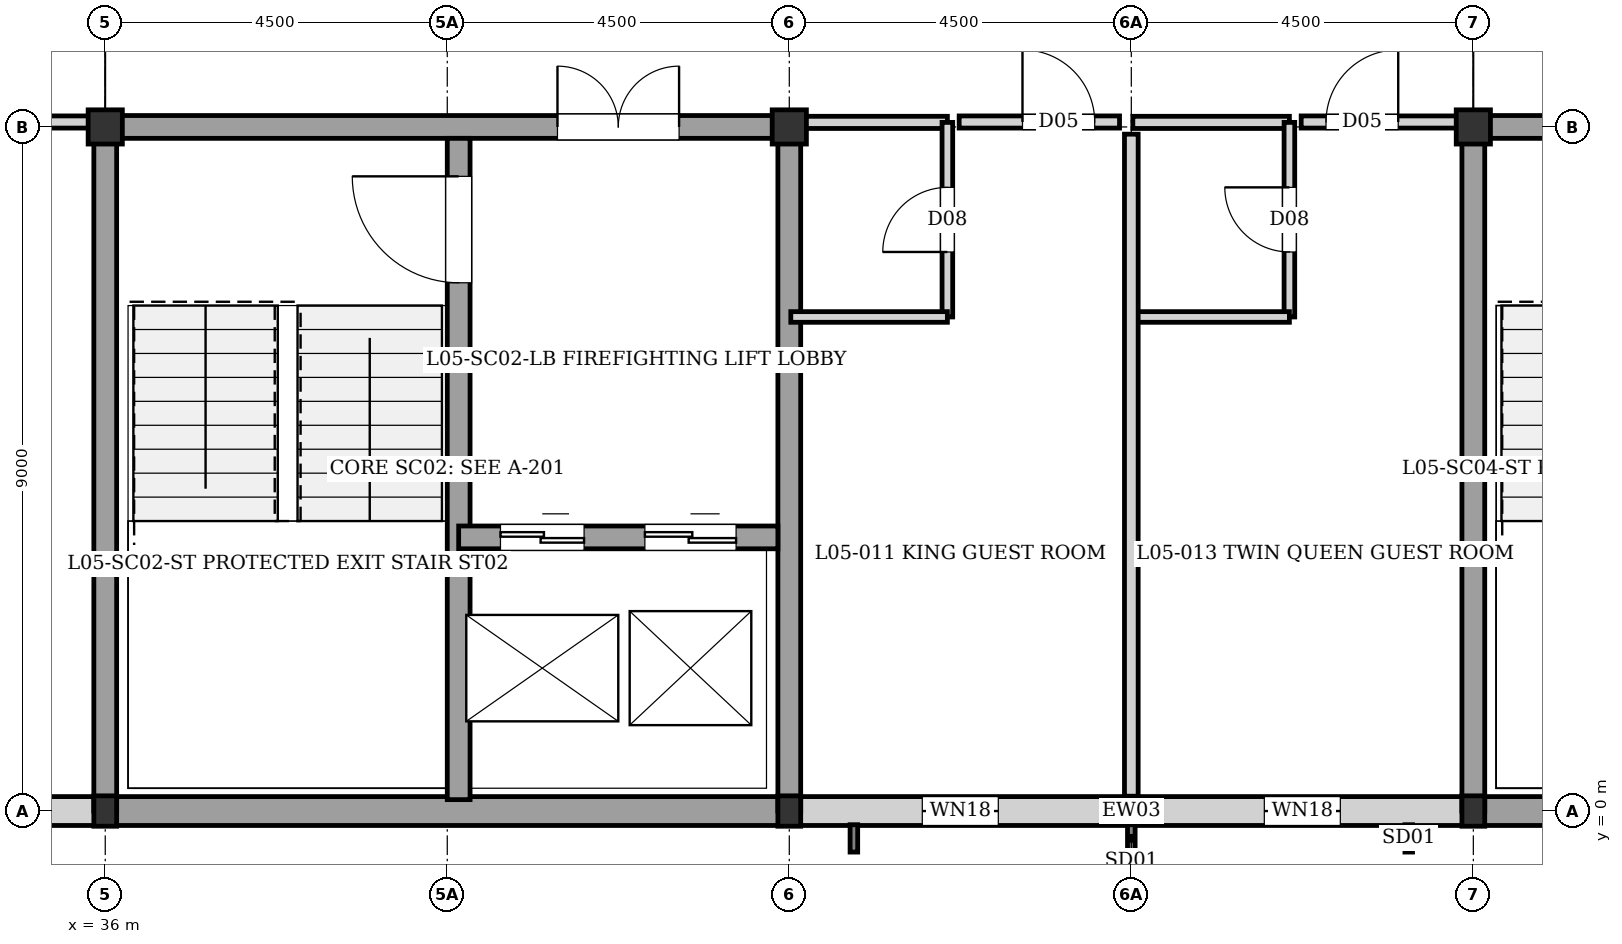
"""IFC4 building model, lengths in metres.
Left out: names, types, materials, properties, quantities, classifications, styles, units other than length and angle.
Written with IfcOpenShell. Run it as: python <this file> out.ifc"""

import sys

from ifc_helpers import new_model, si_unit, direction, frame, frame_2d, origin, origin_2d, place, context, subcontext, project, spatial, rectangle, i_section, extrude, element, fill, save


model = new_model("IFC4")
c1 = context("Model", 3, precision=1e-05, world=origin(), true_north=direction((0.0, 1.0)))
c2 = subcontext(c1, "Body", "Model", "MODEL_VIEW")
j1 = project(units=[si_unit("LENGTHUNIT", "METRE"), si_unit("PLANEANGLEUNIT", "RADIAN")], contexts=[c1])
p1 = place(None, origin())
s1 = spatial("IfcSite", under=j1, at=p1, CompositionType="ELEMENT")
p2 = place(p1, origin())
s2 = spatial("IfcBuilding", under=s1, at=p2, CompositionType="ELEMENT")
p3 = place(p2, frame((0.0, 0.0, 17.6)))
s3 = spatial("IfcBuildingStorey", under=s2, at=p3, CompositionType="ELEMENT", Elevation=17.6)
p4 = place(p3, frame((36.0, 0.0, 0.0), z_axis=(0.0, 0.0, 1.0), x_axis=(1.0, 0.0, 0.0)))
e1 = element("IfcColumn", 1, at=p4, inside=s3, PredefinedType="COLUMN", context=c2, shape_type="SweptSolid", body=[
    extrude(i_section(OverallWidth=0.3, OverallDepth=0.4, WebThickness=0.013, FlangeThickness=0.024, at=origin_2d()), origin(), (0.0, 0.0, 1.0), 3.04),
])
p5 = place(p3, frame((36.0, 9.0, 0.0), z_axis=(0.0, 0.0, 1.0), x_axis=(1.0, 0.0, 0.0)))
e2 = element("IfcColumn", 2, at=p5, inside=s3, PredefinedType="COLUMN", context=c2, shape_type="SweptSolid", body=[
    extrude(rectangle(XDim=0.45, YDim=0.45, at=origin_2d()), origin(), (0.0, 0.0, 1.0), 3.04),
])
p6 = place(p3, frame((45.0, 0.0, 0.0), z_axis=(0.0, 0.0, 1.0), x_axis=(1.0, 0.0, 0.0)))
e3 = element("IfcColumn", 3, at=p6, inside=s3, PredefinedType="COLUMN", context=c2, shape_type="SweptSolid", body=[
    extrude(i_section(OverallWidth=0.3, OverallDepth=0.4, WebThickness=0.013, FlangeThickness=0.024, at=origin_2d()), origin(), (0.0, 0.0, 1.0), 3.04),
])
p7 = place(p3, frame((45.0, 9.0, 0.0), z_axis=(0.0, 0.0, 1.0), x_axis=(1.0, 0.0, 0.0)))
e4 = element("IfcColumn", 4, at=p7, inside=s3, PredefinedType="COLUMN", context=c2, shape_type="SweptSolid", body=[
    extrude(rectangle(XDim=0.45, YDim=0.45, at=origin_2d()), origin(), (0.0, 0.0, 1.0), 3.04),
])
p8 = place(p3, frame((54.0, 0.0, 0.0), z_axis=(0.0, 0.0, 1.0), x_axis=(1.0, 0.0, 0.0)))
e5 = element("IfcColumn", 5, at=p8, inside=s3, PredefinedType="COLUMN", context=c2, shape_type="SweptSolid", body=[
    extrude(i_section(OverallWidth=0.3, OverallDepth=0.4, WebThickness=0.013, FlangeThickness=0.024, at=origin_2d()), origin(), (0.0, 0.0, 1.0), 3.04),
])
p9 = place(p3, frame((54.0, 9.0, 0.0), z_axis=(0.0, 0.0, 1.0), x_axis=(1.0, 0.0, 0.0)))
e6 = element("IfcColumn", 6, at=p9, inside=s3, PredefinedType="COLUMN", context=c2, shape_type="SweptSolid", body=[
    extrude(rectangle(XDim=0.45, YDim=0.45, at=origin_2d()), origin(), (0.0, 0.0, 1.0), 3.04),
])
p10 = place(p3, frame((63.0, 0.0, 0.0), z_axis=(0.0, 0.0, 1.0), x_axis=(-1.0, 0.0, 0.0)))
e7 = element("IfcWall", 7, at=p10, inside=s3, PredefinedType="SOLIDWALL", context=c2, shape_type="SweptSolid", body=[
    extrude(rectangle(XDim=9.0, YDim=0.38, at=frame_2d((4.5, 0.0))), origin(), (0.0, 0.0, 1.0), 2.82),
])
p11 = place(p3, frame((53.87, 0.0, 0.0), z_axis=(0.0, 0.0, 1.0), x_axis=(-1.0, 0.0, 0.0)))
e8 = element("IfcWall", 8, at=p11, inside=s3, PredefinedType="SOLIDWALL", context=c2, shape_type="SweptSolid", body=[
    extrude(rectangle(XDim=8.74, YDim=0.38, at=frame_2d((4.37, 0.0))), origin(), (0.0, 0.0, 1.0), 2.55),
])
p12 = place(p11, frame((1.62, 0.0, 0.35)))
e9 = element("IfcOpeningElement", 9, at=p12, cuts=e8, PredefinedType="OPENING", context=c2, shape_type="SweptSolid", body=[
    extrude(rectangle(XDim=1.0, YDim=1.6, at=frame_2d((0.5, 0.8))), frame((0.0, 0.2, 0.0), z_axis=(0.0, -1.0, 0.0), x_axis=(1.0, 0.0, 0.0)), (0.0, 0.0, 1.0), 0.4),
])
p13 = place(p11, frame((6.12, 0.0, 0.35)))
e10 = element("IfcOpeningElement", 10, at=p13, cuts=e8, PredefinedType="OPENING", context=c2, shape_type="SweptSolid", body=[
    extrude(rectangle(XDim=1.0, YDim=1.6, at=frame_2d((0.5, 0.8))), frame((0.0, 0.2, 0.0), z_axis=(0.0, -1.0, 0.0), x_axis=(1.0, 0.0, 0.0)), (0.0, 0.0, 1.0), 0.4),
])
p14 = place(p3, frame((45.0, 0.0, 0.0), z_axis=(0.0, 0.0, 1.0), x_axis=(-1.0, 0.0, 0.0)))
e11 = element("IfcWall", 11, at=p14, inside=s3, PredefinedType="SOLIDWALL", context=c2, shape_type="SweptSolid", body=[
    extrude(rectangle(XDim=9.0, YDim=0.38, at=frame_2d((4.5, 0.0))), origin(), (0.0, 0.0, 1.0), 2.82),
])
p15 = place(p3, frame((35.87, 0.0, 0.0), z_axis=(0.0, 0.0, 1.0), x_axis=(-1.0, 0.0, 0.0)))
e12 = element("IfcWall", 12, at=p15, inside=s3, PredefinedType="SOLIDWALL", context=c2, shape_type="SweptSolid", body=[
    extrude(rectangle(XDim=8.87, YDim=0.38, at=frame_2d((4.435, 0.0))), origin(), (0.0, 0.0, 1.0), 2.42),
])
p16 = place(p15, frame((1.62, 0.0, 0.35)))
e13 = element("IfcOpeningElement", 13, at=p16, cuts=e12, PredefinedType="OPENING", context=c2, shape_type="SweptSolid", body=[
    extrude(rectangle(XDim=1.0, YDim=1.6, at=frame_2d((0.5, 0.8))), frame((0.0, 0.2, 0.0), z_axis=(0.0, -1.0, 0.0), x_axis=(1.0, 0.0, 0.0)), (0.0, 0.0, 1.0), 0.4),
])
p17 = place(p15, frame((6.12, 0.0, 0.35)))
e14 = element("IfcOpeningElement", 14, at=p17, cuts=e12, PredefinedType="OPENING", context=c2, shape_type="SweptSolid", body=[
    extrude(rectangle(XDim=1.0, YDim=1.6, at=frame_2d((0.5, 0.8))), frame((0.0, 0.2, 0.0), z_axis=(0.0, -1.0, 0.0), x_axis=(1.0, 0.0, 0.0)), (0.0, 0.0, 1.0), 0.4),
])
p18 = place(p3, frame((45.0, 0.0, 0.0), z_axis=(0.0, 0.0, 1.0), x_axis=(0.0, 1.0, 0.0)))
e15 = element("IfcWall", 15, at=p18, inside=s3, PredefinedType="SHEAR", context=c2, shape_type="SweptSolid", body=[
    extrude(rectangle(XDim=9.0, YDim=0.3, at=frame_2d((4.5, 0.0))), origin(), (0.0, 0.0, 1.0), 2.82),
])
p19 = place(p3, frame((36.0, 9.0, 0.0), z_axis=(0.0, 0.0, 1.0), x_axis=(1.0, 0.0, 0.0)))
e16 = element("IfcWall", 16, at=p19, inside=s3, PredefinedType="SHEAR", context=c2, shape_type="SweptSolid", body=[
    extrude(rectangle(XDim=9.0, YDim=0.3, at=frame_2d((4.5, 0.0))), origin(), (0.0, 0.0, 1.0), 2.82),
])
p20 = place(p19, frame((5.95, 0.0, 0.0)))
e17 = element("IfcOpeningElement", 17, at=p20, cuts=e16, PredefinedType="OPENING", context=c2, shape_type="SweptSolid", body=[
    extrude(rectangle(XDim=1.6, YDim=2.1, at=frame_2d((0.8, 1.05))), frame((0.0, 0.16, 0.0), z_axis=(0.0, -1.0, 0.0), x_axis=(1.0, 0.0, 0.0)), (0.0, 0.0, 1.0), 0.32),
])
p21 = place(p3, frame((36.0, 0.0, 0.0), z_axis=(0.0, 0.0, 1.0), x_axis=(0.0, 1.0, 0.0)))
e18 = element("IfcWall", 18, at=p21, inside=s3, PredefinedType="SHEAR", context=c2, shape_type="SweptSolid", body=[
    extrude(rectangle(XDim=9.0, YDim=0.3, at=frame_2d((4.5, 0.0))), origin(), (0.0, 0.0, 1.0), 2.82),
])
p22 = place(p3, frame((40.65, 0.15, 0.0), z_axis=(0.0, 0.0, 1.0), x_axis=(0.0, 1.0, 0.0)))
e19 = element("IfcWall", 19, at=p22, inside=s3, PredefinedType="SHEAR", context=c2, shape_type="SweptSolid", body=[
    extrude(rectangle(XDim=8.7, YDim=0.3, at=frame_2d((4.35, 0.0))), origin(), (0.0, 0.0, 1.0), 2.82),
])
p23 = place(p22, frame((6.8, 0.0, 0.0)))
e20 = element("IfcOpeningElement", 20, at=p23, cuts=e19, PredefinedType="OPENING", context=c2, shape_type="SweptSolid", body=[
    extrude(rectangle(XDim=1.4, YDim=2.02, at=frame_2d((0.7, 1.01))), frame((0.0, 0.16, 0.0), z_axis=(0.0, -1.0, 0.0), x_axis=(1.0, 0.0, 0.0)), (0.0, 0.0, 1.0), 0.32),
])
p24 = place(p3, frame((40.65, 3.6, 0.0), z_axis=(0.0, 0.0, 1.0), x_axis=(1.0, 0.0, 0.0)))
e21 = element("IfcWall", 21, at=p24, inside=s3, PredefinedType="SHEAR", context=c2, shape_type="SweptSolid", body=[
    extrude(rectangle(XDim=4.2, YDim=0.3, at=frame_2d((2.1, 0.0))), origin(), (0.0, 0.0, 1.0), 2.82),
])
p25 = place(p24, frame((0.55, 0.0, 0.0)))
e22 = element("IfcOpeningElement", 22, at=p25, cuts=e21, PredefinedType="OPENING", context=c2, shape_type="SweptSolid", body=[
    extrude(rectangle(XDim=1.1, YDim=2.1, at=frame_2d((0.55, 1.05))), frame((0.0, 0.16, 0.0), z_axis=(0.0, -1.0, 0.0), x_axis=(1.0, 0.0, 0.0)), (0.0, 0.0, 1.0), 0.32),
])
p26 = place(p24, frame((2.45, 0.0, 0.0)))
e23 = element("IfcOpeningElement", 23, at=p26, cuts=e21, PredefinedType="OPENING", context=c2, shape_type="SweptSolid", body=[
    extrude(rectangle(XDim=1.2, YDim=2.2, at=frame_2d((0.6, 1.1))), frame((0.0, 0.16, 0.0), z_axis=(0.0, -1.0, 0.0), x_axis=(1.0, 0.0, 0.0)), (0.0, 0.0, 1.0), 0.32),
])
p27 = place(p3, frame((54.0, 9.0, 0.0), z_axis=(0.0, 0.0, 1.0), x_axis=(1.0, 0.0, 0.0)))
e24 = element("IfcWall", 24, at=p27, inside=s3, PredefinedType="SHEAR", context=c2, shape_type="SweptSolid", body=[
    extrude(rectangle(XDim=9.0, YDim=0.3, at=frame_2d((4.5, 0.0))), origin(), (0.0, 0.0, 1.0), 2.82),
])
p28 = place(p27, frame((6.05, 0.0, 0.0)))
e25 = element("IfcOpeningElement", 25, at=p28, cuts=e24, PredefinedType="OPENING", context=c2, shape_type="SweptSolid", body=[
    extrude(rectangle(XDim=1.4, YDim=2.02, at=frame_2d((0.7, 1.01))), frame((0.0, 0.16, 0.0), z_axis=(0.0, -1.0, 0.0), x_axis=(1.0, 0.0, 0.0)), (0.0, 0.0, 1.0), 0.32),
])
p29 = place(p3, frame((54.0, 0.0, 0.0), z_axis=(0.0, 0.0, 1.0), x_axis=(0.0, 1.0, 0.0)))
e26 = element("IfcWall", 26, at=p29, inside=s3, PredefinedType="SHEAR", context=c2, shape_type="SweptSolid", body=[
    extrude(rectangle(XDim=9.0, YDim=0.3, at=frame_2d((4.5, 0.0))), origin(), (0.0, 0.0, 1.0), 2.82),
])
p30 = place(p3, frame((45.02, 9.06, 0.0), z_axis=(0.0, 0.0, 1.0), x_axis=(1.0, 0.0, 0.0)))
e27 = element("IfcWall", 27, at=p30, inside=s3, PredefinedType="PARTITIONING", context=c2, shape_type="SweptSolid", body=[
    extrude(rectangle(XDim=2.06, YDim=0.16, at=frame_2d((1.03, 0.0))), origin(), (0.0, 0.0, 1.0), 2.38),
])
p31 = place(p3, frame((47.08, 6.5, 0.0), z_axis=(0.0, 0.0, 1.0), x_axis=(0.0, 1.0, 0.0)))
e28 = element("IfcWall", 28, at=p31, inside=s3, PredefinedType="PLUMBINGWALL", context=c2, shape_type="SweptSolid", body=[
    extrude(rectangle(XDim=2.56, YDim=0.14, at=frame_2d((1.28, 0.0))), origin(), (0.0, 0.0, 1.0), 2.82),
])
p32 = place(p31, frame((0.855, 0.0, 0.0)))
e29 = element("IfcOpeningElement", 29, at=p32, cuts=e28, PredefinedType="OPENING", context=c2, shape_type="SweptSolid", body=[
    extrude(rectangle(XDim=0.85, YDim=2.04, at=frame_2d((0.425, 1.02))), frame((0.0, 0.08, 0.0), z_axis=(0.0, -1.0, 0.0), x_axis=(1.0, 0.0, 0.0)), (0.0, 0.0, 1.0), 0.16),
])
p33 = place(p3, frame((45.02, 6.5, 0.0), z_axis=(0.0, 0.0, 1.0), x_axis=(1.0, 0.0, 0.0)))
e30 = element("IfcWall", 30, at=p33, inside=s3, PredefinedType="PLUMBINGWALL", context=c2, shape_type="SweptSolid", body=[
    extrude(rectangle(XDim=2.06, YDim=0.14, at=frame_2d((1.03, 0.0))), origin(), (0.0, 0.0, 1.0), 2.82),
])
p34 = place(p3, frame((49.52, 9.06, 0.0), z_axis=(0.0, 0.0, 1.0), x_axis=(1.0, 0.0, 0.0)))
e31 = element("IfcWall", 31, at=p34, inside=s3, PredefinedType="PARTITIONING", context=c2, shape_type="SweptSolid", body=[
    extrude(rectangle(XDim=2.06, YDim=0.16, at=frame_2d((1.03, 0.0))), origin(), (0.0, 0.0, 1.0), 2.38),
])
p35 = place(p3, frame((51.58, 6.5, 0.0), z_axis=(0.0, 0.0, 1.0), x_axis=(0.0, 1.0, 0.0)))
e32 = element("IfcWall", 32, at=p35, inside=s3, PredefinedType="PLUMBINGWALL", context=c2, shape_type="SweptSolid", body=[
    extrude(rectangle(XDim=2.56, YDim=0.14, at=frame_2d((1.28, 0.0))), origin(), (0.0, 0.0, 1.0), 2.82),
])
p36 = place(p35, frame((0.855, 0.0, 0.0)))
e33 = element("IfcOpeningElement", 33, at=p36, cuts=e32, PredefinedType="OPENING", context=c2, shape_type="SweptSolid", body=[
    extrude(rectangle(XDim=0.85, YDim=2.04, at=frame_2d((0.425, 1.02))), frame((0.0, 0.08, 0.0), z_axis=(0.0, -1.0, 0.0), x_axis=(1.0, 0.0, 0.0)), (0.0, 0.0, 1.0), 0.16),
])
p37 = place(p3, frame((49.52, 6.5, 0.0), z_axis=(0.0, 0.0, 1.0), x_axis=(1.0, 0.0, 0.0)))
e34 = element("IfcWall", 34, at=p37, inside=s3, PredefinedType="PLUMBINGWALL", context=c2, shape_type="SweptSolid", body=[
    extrude(rectangle(XDim=2.06, YDim=0.14, at=frame_2d((1.03, 0.0))), origin(), (0.0, 0.0, 1.0), 2.82),
])
p38 = place(p3, frame((49.5, 0.195, 0.0), z_axis=(0.0, 0.0, 1.0), x_axis=(0.0, 1.0, 0.0)))
e35 = element("IfcWall", 35, at=p38, inside=s3, PredefinedType="PARTITIONING", context=c2, shape_type="SweptSolid", body=[
    extrude(rectangle(XDim=8.71, YDim=0.18, at=frame_2d((4.355, 0.0))), origin(), (0.0, 0.0, 1.0), 2.82),
])
p39 = place(p3, frame((29.285, 9.065, 0.0), z_axis=(0.0, 0.0, 1.0), x_axis=(1.0, 0.0, 0.0)))
e36 = element("IfcWall", 36, at=p39, inside=s3, PredefinedType="PARTITIONING", context=c2, shape_type="SweptSolid", body=[
    extrude(rectangle(XDim=6.56, YDim=0.16, at=frame_2d((3.28, 0.0))), origin(), (0.0, 0.0, 1.0), 2.29),
])
p40 = place(p39, frame((1.75, 0.0, 0.0)))
e37 = element("IfcOpeningElement", 37, at=p40, cuts=e36, PredefinedType="OPENING", context=c2, shape_type="SweptSolid", body=[
    extrude(rectangle(XDim=1.3, YDim=2.25, at=frame_2d((0.65, 1.125))), frame((0.0, 0.09, 0.0), z_axis=(0.0, -1.0, 0.0), x_axis=(1.0, 0.0, 0.0)), (0.0, 0.0, 1.0), 0.18),
])
p41 = place(p3, frame((47.235, 9.065, 0.0), z_axis=(0.0, 0.0, 1.0), x_axis=(1.0, 0.0, 0.0)))
e38 = element("IfcWall", 38, at=p41, inside=s3, PredefinedType="PARTITIONING", context=c2, shape_type="SweptSolid", body=[
    extrude(rectangle(XDim=2.11, YDim=0.16, at=frame_2d((1.055, 0.0))), origin(), (0.0, 0.0, 1.0), 2.38),
])
p42 = place(p41, frame((0.833, 0.0, 0.0)))
e39 = element("IfcOpeningElement", 39, at=p42, cuts=e38, PredefinedType="OPENING", context=c2, shape_type="SweptSolid", body=[
    extrude(rectangle(XDim=0.95, YDim=2.15, at=frame_2d((0.475, 1.075))), frame((0.0, 0.09, 0.0), z_axis=(0.0, -1.0, 0.0), x_axis=(1.0, 0.0, 0.0)), (0.0, 0.0, 1.0), 0.18),
])
p43 = place(p3, frame((51.735, 9.065, 0.0), z_axis=(0.0, 0.0, 1.0), x_axis=(1.0, 0.0, 0.0)))
e40 = element("IfcWall", 40, at=p43, inside=s3, PredefinedType="PARTITIONING", context=c2, shape_type="SweptSolid", body=[
    extrude(rectangle(XDim=2.11, YDim=0.16, at=frame_2d((1.055, 0.0))), origin(), (0.0, 0.0, 1.0), 2.38),
])
p44 = place(p43, frame((0.327, 0.0, 0.0)))
e41 = element("IfcOpeningElement", 41, at=p44, cuts=e40, PredefinedType="OPENING", context=c2, shape_type="SweptSolid", body=[
    extrude(rectangle(XDim=0.95, YDim=2.15, at=frame_2d((0.475, 1.075))), frame((0.0, 0.09, 0.0), z_axis=(0.0, -1.0, 0.0), x_axis=(1.0, 0.0, 0.0)), (0.0, 0.0, 1.0), 0.18),
])
p45 = place(p12, origin())
e42 = element("IfcWindow", 42, at=p45, inside=s3, PartitioningType="SINGLE_PANEL", PredefinedType="WINDOW", context=c2, shape_type="SweptSolid", body=[
    extrude(rectangle(XDim=1.0, YDim=1.6, at=frame_2d((0.5, 0.8))), frame((0.0, 0.03, 0.0), z_axis=(0.0, -1.0, 0.0), x_axis=(1.0, 0.0, 0.0)), (0.0, 0.0, 1.0), 0.06),
])
fill(e9, e42)
p46 = place(p13, origin())
e43 = element("IfcWindow", 43, at=p46, inside=s3, PartitioningType="SINGLE_PANEL", PredefinedType="WINDOW", context=c2, shape_type="SweptSolid", body=[
    extrude(rectangle(XDim=1.0, YDim=1.6, at=frame_2d((0.5, 0.8))), frame((0.0, 0.03, 0.0), z_axis=(0.0, -1.0, 0.0), x_axis=(1.0, 0.0, 0.0)), (0.0, 0.0, 1.0), 0.06),
])
fill(e10, e43)
p47 = place(p20, origin())
e44 = element("IfcDoor", 44, at=p47, inside=s3, OperationType="DOUBLE_DOOR_SINGLE_SWING", PredefinedType="DOOR", context=c2, shape_type="SweptSolid", body=[
    extrude(rectangle(XDim=1.6, YDim=2.1, at=frame_2d((0.8, 1.05))), frame((0.0, 0.025, 0.0), z_axis=(0.0, -1.0, 0.0), x_axis=(1.0, 0.0, 0.0)), (0.0, 0.0, 1.0), 0.05),
])
fill(e17, e44)
p48 = place(p23, origin())
e45 = element("IfcDoor", 45, at=p48, inside=s3, OperationType="SINGLE_SWING_RIGHT", PredefinedType="DOOR", context=c2, shape_type="SweptSolid", body=[
    extrude(rectangle(XDim=1.4, YDim=2.02, at=frame_2d((0.7, 1.01))), frame((0.0, 0.025, 0.0), z_axis=(0.0, -1.0, 0.0), x_axis=(1.0, 0.0, 0.0)), (0.0, 0.0, 1.0), 0.05),
])
fill(e20, e45)
p49 = place(p25, origin())
e46 = element("IfcDoor", 46, at=p49, inside=s3, OperationType="DOUBLE_DOOR_SLIDING", PredefinedType="DOOR", context=c2, shape_type="SweptSolid", body=[
    extrude(rectangle(XDim=1.1, YDim=2.1, at=frame_2d((0.55, 1.05))), frame((0.0, 0.025, 0.0), z_axis=(0.0, -1.0, 0.0), x_axis=(1.0, 0.0, 0.0)), (0.0, 0.0, 1.0), 0.05),
])
fill(e22, e46)
p50 = place(p26, origin())
e47 = element("IfcDoor", 47, at=p50, inside=s3, OperationType="DOUBLE_DOOR_SLIDING", PredefinedType="DOOR", context=c2, shape_type="SweptSolid", body=[
    extrude(rectangle(XDim=1.2, YDim=2.2, at=frame_2d((0.6, 1.1))), frame((0.0, 0.025, 0.0), z_axis=(0.0, -1.0, 0.0), x_axis=(1.0, 0.0, 0.0)), (0.0, 0.0, 1.0), 0.05),
])
fill(e23, e47)
p51 = place(p32, origin())
e48 = element("IfcDoor", 48, at=p51, inside=s3, OperationType="SINGLE_SWING_LEFT", PredefinedType="DOOR", context=c2, shape_type="SweptSolid", body=[
    extrude(rectangle(XDim=0.85, YDim=2.04, at=frame_2d((0.425, 1.02))), frame((0.0, 0.025, 0.0), z_axis=(0.0, -1.0, 0.0), x_axis=(1.0, 0.0, 0.0)), (0.0, 0.0, 1.0), 0.05),
])
fill(e29, e48)
p52 = place(p36, origin())
e49 = element("IfcDoor", 49, at=p52, inside=s3, OperationType="SINGLE_SWING_RIGHT", PredefinedType="DOOR", context=c2, shape_type="SweptSolid", body=[
    extrude(rectangle(XDim=0.85, YDim=2.04, at=frame_2d((0.425, 1.02))), frame((0.0, 0.025, 0.0), z_axis=(0.0, -1.0, 0.0), x_axis=(1.0, 0.0, 0.0)), (0.0, 0.0, 1.0), 0.05),
])
fill(e33, e49)
p53 = place(p42, origin())
e50 = element("IfcDoor", 50, at=p53, inside=s3, OperationType="SINGLE_SWING_LEFT", PredefinedType="DOOR", context=c2, shape_type="SweptSolid", body=[
    extrude(rectangle(XDim=0.95, YDim=2.15, at=frame_2d((0.475, 1.075))), frame((0.0, 0.025, 0.0), z_axis=(0.0, -1.0, 0.0), x_axis=(1.0, 0.0, 0.0)), (0.0, 0.0, 1.0), 0.05),
])
fill(e39, e50)
p54 = place(p44, origin())
e51 = element("IfcDoor", 51, at=p54, inside=s3, OperationType="SINGLE_SWING_RIGHT", PredefinedType="DOOR", context=c2, shape_type="SweptSolid", body=[
    extrude(rectangle(XDim=0.95, YDim=2.15, at=frame_2d((0.475, 1.075))), frame((0.0, 0.025, 0.0), z_axis=(0.0, -1.0, 0.0), x_axis=(1.0, 0.0, 0.0)), (0.0, 0.0, 1.0), 0.05),
])
fill(e41, e51)
save(model, sys.argv[1])
